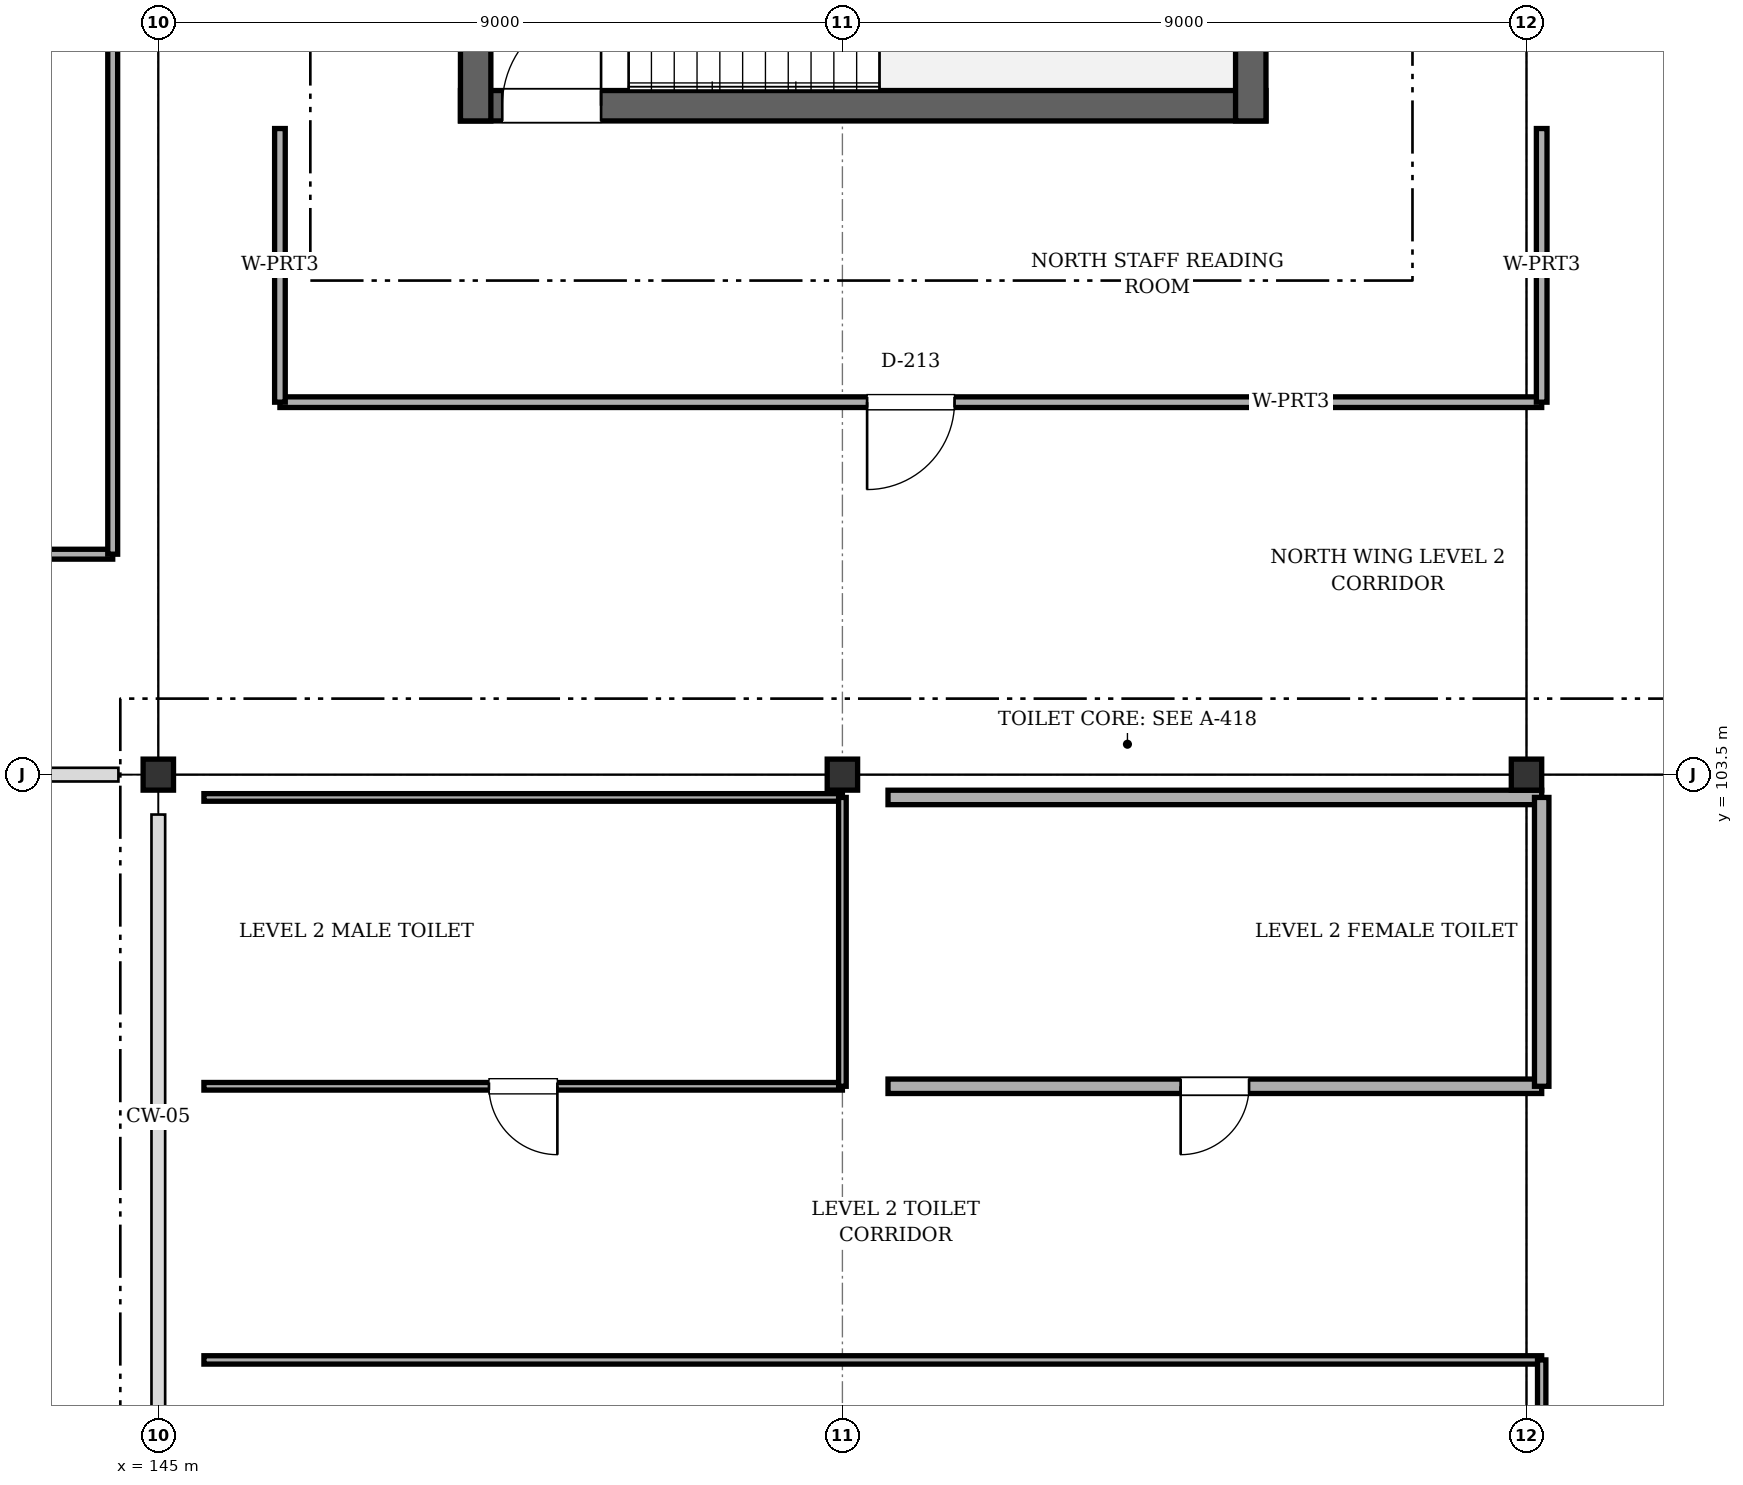
"""IFC4 building model, lengths in metres.
Left out: names, types, materials, properties, quantities, classifications, styles, units other than length and angle.
Written with IfcOpenShell. Run it as: python <this file> out.ifc"""

import sys

from ifc_helpers import new_model, si_unit, direction, frame, frame_2d, origin, origin_2d, place, context, subcontext, project, spatial, rectangle, i_section, extrude, element, fill, save


model = new_model("IFC4")
c1 = context("Model", 3, precision=1e-05, world=origin(), true_north=direction((0.0, 1.0)))
c2 = subcontext(c1, "Body", "Model", "MODEL_VIEW")
j1 = project(units=[si_unit("LENGTHUNIT", "METRE"), si_unit("PLANEANGLEUNIT", "RADIAN")], contexts=[c1])
p1 = place(None, origin())
s1 = spatial("IfcSite", under=j1, at=p1, CompositionType="ELEMENT")
p2 = place(p1, origin())
s2 = spatial("IfcBuilding", under=s1, at=p2, CompositionType="ELEMENT")
p3 = place(p2, frame((0.0, 0.0, 10.8)))
s3 = spatial("IfcBuildingStorey", under=s2, at=p3, CompositionType="ELEMENT", Elevation=10.8)
for number, where, z_axis, x_axis in (
    (1, (145.0, 103.5, 0.0), (0.0, 0.0, 1.0), (1.0, 0.0, 0.0)),
    (2, (154.0, 103.5, 0.0), (0.0, 0.0, 1.0), (1.0, 0.0, 0.0)),
    (3, (163.0, 103.5, 0.0), (0.0, 0.0, 1.0), (1.0, 0.0, 0.0)),
):
    element("IfcColumn", number, at=place(p3, frame(where, z_axis=z_axis, x_axis=x_axis)), inside=s3, PredefinedType="COLUMN", context=c2, shape_type="SweptSolid", body=[
        extrude(i_section(OverallWidth=0.4, OverallDepth=0.408, WebThickness=0.021, FlangeThickness=0.021, FilletRadius=0.022, at=origin_2d()), origin(), (0.0, 0.0, 1.0), 3.6),
    ])
p4 = place(p3, frame((148.975, 112.3, 0.0), z_axis=(0.0, 0.0, 1.0), x_axis=(1.0, 0.0, 0.0)))
e4 = element("IfcWall", 4, at=p4, inside=s3, PredefinedType="SHEAR", context=c2, shape_type="SweptSolid", body=[
    extrude(rectangle(XDim=10.597, YDim=0.4, at=frame_2d((5.299, 0.0))), origin(), (0.0, 0.0, 1.0), 3.38),
])
p5 = place(p4, frame((0.55, 0.0, 0.0)))
e5 = element("IfcOpeningElement", 5, at=p5, cuts=e4, PredefinedType="OPENING", context=c2, shape_type="SweptSolid", body=[
    extrude(rectangle(XDim=1.3, YDim=2.1, at=frame_2d((0.65, 1.05))), frame((0.0, 0.21, 0.0), z_axis=(0.0, -1.0, 0.0), x_axis=(1.0, 0.0, 0.0)), (0.0, 0.0, 1.0), 0.42),
])
for number, where, z_axis, x_axis in (
    (6, (159.373, 112.1, 0.0), (0.0, 0.0, 1.0), (0.0, 1.0, 0.0)),
    (7, (149.175, 116.52, 0.0), (0.0, 0.0, 1.0), (0.0, -1.0, 0.0)),
):
    element("IfcWall", number, at=place(p3, frame(where, z_axis=z_axis, x_axis=x_axis)), inside=s3, PredefinedType="SHEAR", context=c2, shape_type="SweptSolid", body=[
        extrude(rectangle(XDim=4.42, YDim=0.4, at=frame_2d((2.21, 0.0))), origin(), (0.0, 0.0, 1.0), 3.38),
    ])
p6 = place(p3, frame((144.4, 106.4, 0.0), z_axis=(0.0, 0.0, 1.0), x_axis=(-1.0, 0.0, 0.0)))
e8 = element("IfcWall", 8, at=p6, inside=s3, PredefinedType="PARTITIONING", context=c2, shape_type="SweptSolid", body=[
    extrude(rectangle(XDim=26.8, YDim=0.13, at=frame_2d((13.4, 0.0))), origin(), (0.0, 0.0, 1.0), 2.755),
])
p7 = place(p3, frame((144.4, 125.4, 0.0), z_axis=(0.0, 0.0, 1.0), x_axis=(0.0, -1.0, 0.0)))
e9 = element("IfcWall", 9, at=p7, inside=s3, PredefinedType="PARTITIONING", context=c2, shape_type="SweptSolid", body=[
    extrude(rectangle(XDim=19.0, YDim=0.13, at=frame_2d((9.5, 0.0))), origin(), (0.0, 0.0, 1.0), 2.755),
])
p8 = place(p7, frame((9.225, 0.0, 0.0)))
e10 = element("IfcOpeningElement", 10, at=p8, cuts=e9, PredefinedType="OPENING", context=c2, shape_type="SweptSolid", body=[
    extrude(rectangle(XDim=1.55, YDim=2.1, at=frame_2d((0.775, 1.05))), frame((0.0, 0.075, 0.0), z_axis=(0.0, -1.0, 0.0), x_axis=(1.0, 0.0, 0.0)), (0.0, 0.0, 1.0), 0.15),
])
p9 = place(p3, frame((145.6, 95.8, 0.0), z_axis=(0.0, 0.0, 1.0), x_axis=(1.0, 0.0, 0.0)))
e11 = element("IfcWall", 11, at=p9, inside=s3, PredefinedType="PARTITIONING", context=c2, shape_type="SweptSolid", body=[
    extrude(rectangle(XDim=17.6, YDim=0.11, at=frame_2d((8.8, 0.0))), origin(), (0.0, 0.0, 1.0), 2.965),
])
p10 = place(p3, frame((163.2, 95.8, 0.0), z_axis=(0.0, 0.0, 1.0), x_axis=(0.0, -1.0, 0.0)))
e12 = element("IfcWall", 12, at=p10, inside=s3, PredefinedType="PARTITIONING", context=c2, shape_type="SweptSolid", body=[
    extrude(rectangle(XDim=10.2, YDim=0.11, at=frame_2d((5.1, 0.0))), origin(), (0.0, 0.0, 1.0), 2.915),
])
p11 = place(p10, frame((4.525, 0.0, 0.0)))
e13 = element("IfcOpeningElement", 13, at=p11, cuts=e12, PredefinedType="OPENING", context=c2, shape_type="SweptSolid", body=[
    extrude(rectangle(XDim=1.15, YDim=2.1, at=frame_2d((0.575, 1.05))), frame((0.0, 0.065, 0.0), z_axis=(0.0, -1.0, 0.0), x_axis=(1.0, 0.0, 0.0)), (0.0, 0.0, 1.0), 0.13),
])
p12 = place(p3, frame((154.0, 99.4, 0.0), z_axis=(0.0, 0.0, 1.0), x_axis=(-1.0, 0.0, 0.0)))
e14 = element("IfcWall", 14, at=p12, inside=s3, PredefinedType="PARTITIONING", context=c2, shape_type="SweptSolid", body=[
    extrude(rectangle(XDim=8.4, YDim=0.1, at=frame_2d((4.2, 0.0))), origin(), (0.0, 0.0, 1.0), 2.965),
])
p13 = place(p12, frame((3.75, 0.0, 0.0)))
e15 = element("IfcOpeningElement", 15, at=p13, cuts=e14, PredefinedType="OPENING", context=c2, shape_type="SweptSolid", body=[
    extrude(rectangle(XDim=0.9, YDim=2.1, at=frame_2d((0.45, 1.05))), frame((0.0, 0.06, 0.0), z_axis=(0.0, -1.0, 0.0), x_axis=(1.0, 0.0, 0.0)), (0.0, 0.0, 1.0), 0.12),
])
p14 = place(p3, frame((145.6, 103.2, 0.0), z_axis=(0.0, 0.0, 1.0), x_axis=(1.0, 0.0, 0.0)))
e16 = element("IfcWall", 16, at=p14, inside=s3, PredefinedType="PARTITIONING", context=c2, shape_type="SweptSolid", body=[
    extrude(rectangle(XDim=8.4, YDim=0.1, at=frame_2d((4.2, 0.0))), origin(), (0.0, 0.0, 1.0), 2.755),
])
p15 = place(p3, frame((154.0, 103.2, 0.0), z_axis=(0.0, 0.0, 1.0), x_axis=(0.0, -1.0, 0.0)))
e17 = element("IfcWall", 17, at=p15, inside=s3, PredefinedType="PARTITIONING", context=c2, shape_type="SweptSolid", body=[
    extrude(rectangle(XDim=3.8, YDim=0.1, at=frame_2d((1.9, 0.0))), origin(), (0.0, 0.0, 1.0), 2.915),
])
p16 = place(p3, frame((163.2, 99.4, 0.0), z_axis=(0.0, 0.0, 1.0), x_axis=(-1.0, 0.0, 0.0)))
e18 = element("IfcWall", 18, at=p16, inside=s3, PredefinedType="PARTITIONING", context=c2, shape_type="SweptSolid", body=[
    extrude(rectangle(XDim=8.6, YDim=0.19, at=frame_2d((4.3, 0.0))), origin(), (0.0, 0.0, 1.0), 2.965),
])
p17 = place(p16, frame((3.85, 0.0, 0.0)))
e19 = element("IfcOpeningElement", 19, at=p17, cuts=e18, PredefinedType="OPENING", context=c2, shape_type="SweptSolid", body=[
    extrude(rectangle(XDim=0.9, YDim=2.1, at=frame_2d((0.45, 1.05))), frame((0.0, 0.105, 0.0), z_axis=(0.0, -1.0, 0.0), x_axis=(1.0, 0.0, 0.0)), (0.0, 0.0, 1.0), 0.21),
])
p18 = place(p3, frame((154.6, 103.2, 0.0), z_axis=(0.0, 0.0, 1.0), x_axis=(1.0, 0.0, 0.0)))
e20 = element("IfcWall", 20, at=p18, inside=s3, PredefinedType="PARTITIONING", context=c2, shape_type="SweptSolid", body=[
    extrude(rectangle(XDim=8.6, YDim=0.19, at=frame_2d((4.3, 0.0))), origin(), (0.0, 0.0, 1.0), 2.755),
])
p19 = place(p3, frame((163.2, 103.2, 0.0), z_axis=(0.0, 0.0, 1.0), x_axis=(0.0, -1.0, 0.0)))
e21 = element("IfcWall", 21, at=p19, inside=s3, PredefinedType="PARTITIONING", context=c2, shape_type="SweptSolid", body=[
    extrude(rectangle(XDim=3.8, YDim=0.19, at=frame_2d((1.9, 0.0))), origin(), (0.0, 0.0, 1.0), 2.755),
])
p20 = place(p3, frame((163.2, 108.4, 0.0), z_axis=(0.0, 0.0, 1.0), x_axis=(-1.0, 0.0, 0.0)))
e22 = element("IfcWall", 22, at=p20, inside=s3, PredefinedType="PARTITIONING", context=c2, shape_type="SweptSolid", body=[
    extrude(rectangle(XDim=16.6, YDim=0.14, at=frame_2d((8.3, 0.0))), origin(), (0.0, 0.0, 1.0), 2.755),
])
p21 = place(p20, frame((7.725, 0.0, 0.0)))
e23 = element("IfcOpeningElement", 23, at=p21, cuts=e22, PredefinedType="OPENING", context=c2, shape_type="SweptSolid", body=[
    extrude(rectangle(XDim=1.15, YDim=2.1, at=frame_2d((0.575, 1.05))), frame((0.0, 0.08, 0.0), z_axis=(0.0, -1.0, 0.0), x_axis=(1.0, 0.0, 0.0)), (0.0, 0.0, 1.0), 0.16),
])
p22 = place(p3, frame((146.6, 108.4, 0.0), z_axis=(0.0, 0.0, 1.0), x_axis=(0.0, 1.0, 0.0)))
e24 = element("IfcWall", 24, at=p22, inside=s3, PredefinedType="PARTITIONING", context=c2, shape_type="SweptSolid", body=[
    extrude(rectangle(XDim=3.6, YDim=0.14, at=frame_2d((1.8, 0.0))), origin(), (0.0, 0.0, 1.0), 3.355),
])
p23 = place(p3, frame((163.2, 112.0, 0.0), z_axis=(0.0, 0.0, 1.0), x_axis=(0.0, -1.0, 0.0)))
e25 = element("IfcWall", 25, at=p23, inside=s3, PredefinedType="PARTITIONING", context=c2, shape_type="SweptSolid", body=[
    extrude(rectangle(XDim=3.6, YDim=0.14, at=frame_2d((1.8, 0.0))), origin(), (0.0, 0.0, 1.0), 2.755),
])
p24 = place(p5, origin())
e26 = element("IfcDoor", 26, at=p24, inside=s3, OperationType="SINGLE_SWING_RIGHT", PredefinedType="DOOR", context=c2, shape_type="SweptSolid", body=[
    extrude(rectangle(XDim=1.3, YDim=2.1, at=frame_2d((0.65, 1.05))), frame((0.0, 0.025, 0.0), z_axis=(0.0, -1.0, 0.0), x_axis=(1.0, 0.0, 0.0)), (0.0, 0.0, 1.0), 0.05),
])
fill(e5, e26)
p25 = place(p13, origin())
e27 = element("IfcDoor", 27, at=p25, inside=s3, OperationType="SINGLE_SWING_LEFT", PredefinedType="DOOR", context=c2, shape_type="SweptSolid", body=[
    extrude(rectangle(XDim=0.9, YDim=2.1, at=frame_2d((0.45, 1.05))), frame((0.0, 0.025, 0.0), z_axis=(0.0, -1.0, 0.0), x_axis=(1.0, 0.0, 0.0)), (0.0, 0.0, 1.0), 0.05),
])
fill(e15, e27)
p26 = place(p17, origin())
e28 = element("IfcDoor", 28, at=p26, inside=s3, OperationType="SINGLE_SWING_RIGHT", PredefinedType="DOOR", context=c2, shape_type="SweptSolid", body=[
    extrude(rectangle(XDim=0.9, YDim=2.1, at=frame_2d((0.45, 1.05))), frame((0.0, 0.025, 0.0), z_axis=(0.0, -1.0, 0.0), x_axis=(1.0, 0.0, 0.0)), (0.0, 0.0, 1.0), 0.05),
])
fill(e19, e28)
p27 = place(p21, origin())
e29 = element("IfcDoor", 29, at=p27, inside=s3, OperationType="SINGLE_SWING_RIGHT", PredefinedType="DOOR", context=c2, shape_type="SweptSolid", body=[
    extrude(rectangle(XDim=1.15, YDim=2.1, at=frame_2d((0.575, 1.05))), frame((0.0, 0.025, 0.0), z_axis=(0.0, -1.0, 0.0), x_axis=(1.0, 0.0, 0.0)), (0.0, 0.0, 1.0), 0.05),
])
fill(e23, e29)
save(model, sys.argv[1])
